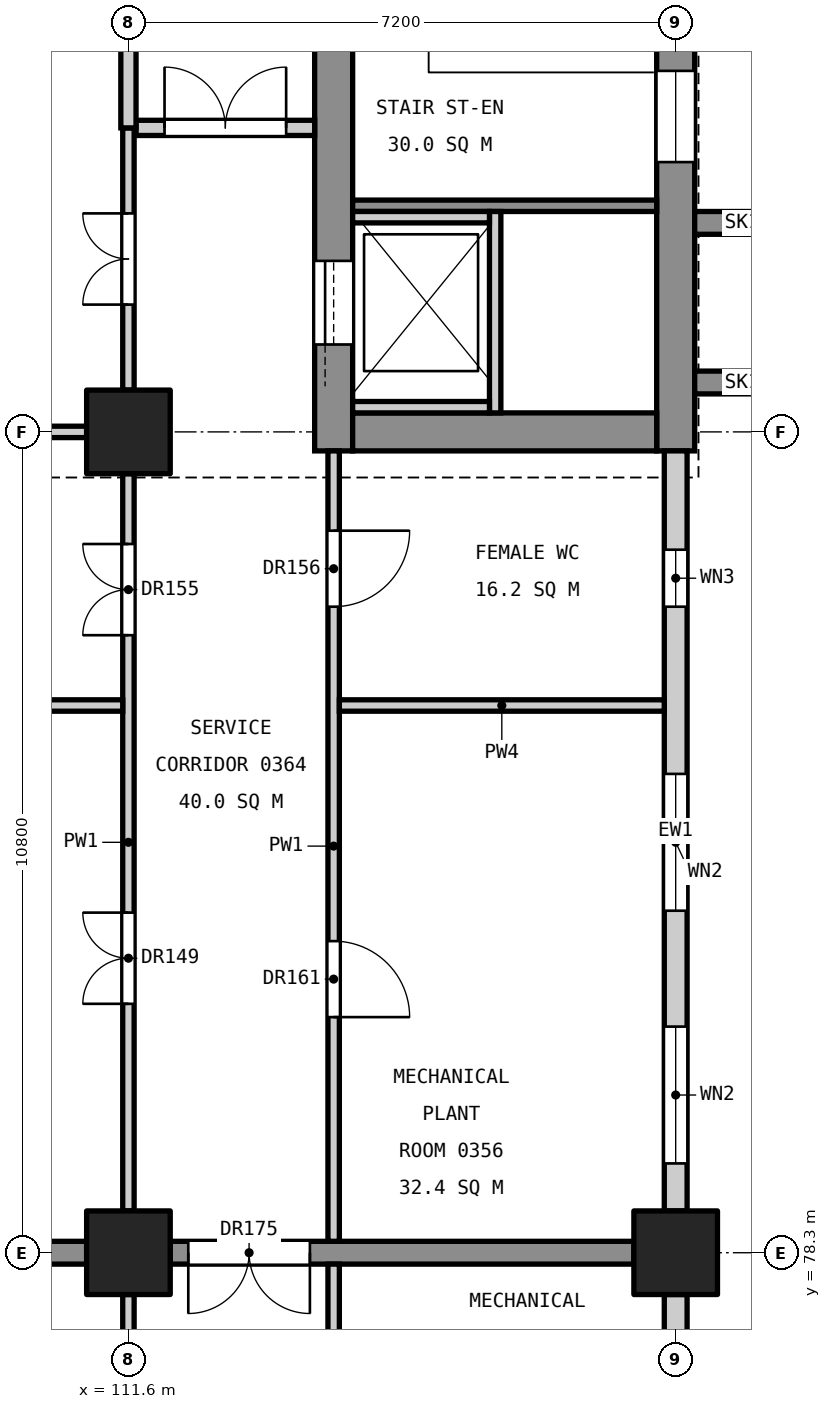
"""IFC4 building model, lengths in metres.
Left out: names, types, materials, properties, quantities, classifications, styles, units other than length and angle.
Written with IfcOpenShell. Run it as: python <this file> out.ifc"""

import sys

from ifc_helpers import new_model, si_unit, direction, frame, frame_2d, origin, origin_2d, place, context, subcontext, project, spatial, rectangle, extrude, element, fill, save


model = new_model("IFC4")
c1 = context("Model", 3, precision=1e-05, world=origin(), true_north=direction((0.0, 1.0)))
c2 = subcontext(c1, "Body", "Model", "MODEL_VIEW")
j1 = project(units=[si_unit("LENGTHUNIT", "METRE"), si_unit("PLANEANGLEUNIT", "RADIAN")], contexts=[c1])
p1 = place(None, origin())
s1 = spatial("IfcSite", under=j1, at=p1, CompositionType="ELEMENT")
p2 = place(p1, origin())
s2 = spatial("IfcBuilding", under=s1, at=p2, CompositionType="ELEMENT")
p3 = place(p2, frame((0.0, 0.0, 16.8)))
s3 = spatial("IfcBuildingStorey", under=s2, at=p3, CompositionType="ELEMENT", Elevation=16.8)
for number, where, z_axis, x_axis in (
    (1, (118.8, 78.3, 0.0), (0.0, 0.0, 1.0), (1.0, 0.0, 0.0)),
    (2, (111.6, 78.3, 0.0), (0.0, 0.0, 1.0), (1.0, 0.0, 0.0)),
    (3, (111.6, 89.1, 0.0), (0.0, 0.0, 1.0), (1.0, 0.0, 0.0)),
):
    element("IfcColumn", number, at=place(p3, frame(where, z_axis=z_axis, x_axis=x_axis)), inside=s3, PredefinedType="COLUMN", context=c2, shape_type="SweptSolid", body=[
        extrude(rectangle(XDim=1.1, YDim=1.1, at=origin_2d()), origin(), (0.0, 0.0, 1.0), 5.4),
    ])
p4 = place(p3, frame((118.8, 88.85, 0.0), z_axis=(0.0, 0.0, 1.0), x_axis=(0.0, 1.0, 0.0)))
e4 = element("IfcWall", 4, at=p4, inside=s3, PredefinedType="SHEAR", context=c2, shape_type="SweptSolid", body=[
    extrude(rectangle(XDim=11.3, YDim=0.5, at=frame_2d((5.65, 0.0))), origin(), (0.0, 0.0, 1.0), 5.15),
])
p5 = place(p4, frame((3.8, 0.0, 3.4)))
e5 = element("IfcOpeningElement", 5, at=p5, cuts=e4, PredefinedType="OPENING", context=c2, shape_type="SweptSolid", body=[
    extrude(rectangle(XDim=1.2, YDim=0.9, at=frame_2d((0.6, 0.45))), frame((0.0, 0.26, 0.0), z_axis=(0.0, -1.0, 0.0), x_axis=(1.0, 0.0, 0.0)), (0.0, 0.0, 1.0), 0.52),
])
p6 = place(p3, frame((114.3, 88.85, 0.0), z_axis=(0.0, 0.0, 1.0), x_axis=(0.0, 1.0, 0.0)))
e6 = element("IfcWall", 6, at=p6, inside=s3, PredefinedType="SHEAR", context=c2, shape_type="SweptSolid", body=[
    extrude(rectangle(XDim=11.3, YDim=0.5, at=frame_2d((5.65, 0.0))), origin(), (0.0, 0.0, 1.0), 5.15),
])
p7 = place(p6, frame((9.35, 0.0, 0.0)))
e7 = element("IfcOpeningElement", 7, at=p7, cuts=e6, PredefinedType="OPENING", context=c2, shape_type="SweptSolid", body=[
    extrude(rectangle(XDim=1.4, YDim=2.1, at=frame_2d((0.7, 1.05))), frame((0.0, 0.26, 0.0), z_axis=(0.0, -1.0, 0.0), x_axis=(1.0, 0.0, 0.0)), (0.0, 0.0, 1.0), 0.52),
])
p8 = place(p6, frame((1.4, 0.0, 0.0)))
e8 = element("IfcOpeningElement", 8, at=p8, cuts=e6, PredefinedType="OPENING", context=c2, shape_type="SweptSolid", body=[
    extrude(rectangle(XDim=1.1, YDim=2.1, at=frame_2d((0.55, 1.05))), frame((0.0, 0.26, 0.0), z_axis=(0.0, -1.0, 0.0), x_axis=(1.0, 0.0, 0.0)), (0.0, 0.0, 1.0), 0.52),
])
p9 = place(p3, frame((118.55, 89.1, 0.0), z_axis=(0.0, 0.0, 1.0), x_axis=(-1.0, 0.0, 0.0)))
e9 = element("IfcWall", 9, at=p9, inside=s3, PredefinedType="SHEAR", context=c2, shape_type="SweptSolid", body=[
    extrude(rectangle(XDim=4.0, YDim=0.5, at=frame_2d((2.0, 0.0))), origin(), (0.0, 0.0, 1.0), 5.15),
])
for number, where, z_axis, x_axis in (
    (10, (119.05, 89.75, 0.0), (0.0, 0.0, 1.0), (1.0, 0.0, 0.0)),
    (11, (119.05, 91.85, 0.0), (0.0, 0.0, 1.0), (1.0, 0.0, 0.0)),
):
    element("IfcWall", number, at=place(p3, frame(where, z_axis=z_axis, x_axis=x_axis)), inside=s3, PredefinedType="SHEAR", context=c2, shape_type="SweptSolid", body=[
        extrude(rectangle(XDim=1.25, YDim=0.3, at=frame_2d((0.625, 0.0))), origin(), (0.0, 0.0, 1.0), 5.4),
    ])
p10 = place(p3, frame((118.25, 78.3, 0.0), z_axis=(0.0, 0.0, 1.0), x_axis=(-1.0, 0.0, 0.0)))
e12 = element("IfcWall", 12, at=p10, inside=s3, PredefinedType="SHEAR", context=c2, shape_type="SweptSolid", body=[
    extrude(rectangle(XDim=6.1, YDim=0.3, at=frame_2d((3.05, 0.0))), origin(), (0.0, 0.0, 1.0), 5.15),
])
p11 = place(p10, frame((4.262, 0.0, 0.0)))
e13 = element("IfcOpeningElement", 13, at=p11, cuts=e12, PredefinedType="OPENING", context=c2, shape_type="SweptSolid", body=[
    extrude(rectangle(XDim=1.6, YDim=2.1, at=frame_2d((0.8, 1.05))), frame((0.0, 0.16, 0.0), z_axis=(0.0, -1.0, 0.0), x_axis=(1.0, 0.0, 0.0)), (0.0, 0.0, 1.0), 0.32),
])
p12 = place(p3, frame((111.05, 78.3, 0.0), z_axis=(0.0, 0.0, 1.0), x_axis=(-1.0, 0.0, 0.0)))
e14 = element("IfcWall", 14, at=p12, inside=s3, PredefinedType="SHEAR", context=c2, shape_type="SweptSolid", body=[
    extrude(rectangle(XDim=9.7, YDim=0.3, at=frame_2d((4.85, 0.0))), origin(), (0.0, 0.0, 1.0), 5.15),
])
p13 = place(p3, frame((118.55, 92.075, 0.0), z_axis=(0.0, 0.0, 1.0), x_axis=(-1.0, 0.0, 0.0)))
e15 = element("IfcWall", 15, at=p13, inside=s3, PredefinedType="SOLIDWALL", context=c2, shape_type="SweptSolid", body=[
    extrude(rectangle(XDim=4.0, YDim=0.15, at=frame_2d((2.0, 0.0))), origin(), (0.0, 0.0, 1.0), 5.15),
])
p14 = place(p3, frame((116.425, 92.0, 0.0), z_axis=(0.0, 0.0, 1.0), x_axis=(0.0, -1.0, 0.0)))
e16 = element("IfcWall", 16, at=p14, inside=s3, PredefinedType="SOLIDWALL", context=c2, shape_type="SweptSolid", body=[
    extrude(rectangle(XDim=2.65, YDim=0.15, at=frame_2d((1.325, 0.0))), origin(), (0.0, 0.0, 1.0), 5.4),
])
for number, where, z_axis, x_axis in (
    (17, (116.35, 91.925, 0.0), (0.0, 0.0, 1.0), (-1.0, 0.0, 0.0)),
    (18, (116.35, 89.425, 0.0), (0.0, 0.0, 1.0), (-1.0, 0.0, 0.0)),
):
    element("IfcWall", number, at=place(p3, frame(where, z_axis=z_axis, x_axis=x_axis)), inside=s3, PredefinedType="SOLIDWALL", context=c2, shape_type="SweptSolid", body=[
        extrude(rectangle(XDim=1.8, YDim=0.15, at=frame_2d((0.9, 0.0))), origin(), (0.0, 0.0, 1.0), 5.4),
    ])
p15 = place(p3, frame((118.8, 74.95, 0.0), z_axis=(0.0, 0.0, 1.0), x_axis=(0.0, 1.0, 0.0)))
e19 = element("IfcWall", 19, at=p15, inside=s3, PredefinedType="STANDARD", context=c2, shape_type="SweptSolid", body=[
    extrude(rectangle(XDim=2.8, YDim=0.3, at=frame_2d((1.4, 0.0))), origin(), (0.0, 0.0, 1.0), 4.25),
])
p16 = place(p15, frame((1.025, 0.0, 0.8)))
e20 = element("IfcOpeningElement", 20, at=p16, cuts=e19, PredefinedType="OPENING", context=c2, shape_type="SweptSolid", body=[
    extrude(rectangle(XDim=0.75, YDim=1.2, at=frame_2d((0.375, 0.6))), frame((0.0, 0.16, 0.0), z_axis=(0.0, -1.0, 0.0), x_axis=(1.0, 0.0, 0.0)), (0.0, 0.0, 1.0), 0.32),
])
p17 = place(p3, frame((118.8, 78.85, 0.0), z_axis=(0.0, 0.0, 1.0), x_axis=(0.0, 1.0, 0.0)))
e21 = element("IfcWall", 21, at=p17, inside=s3, PredefinedType="STANDARD", context=c2, shape_type="SweptSolid", body=[
    extrude(rectangle(XDim=10.0, YDim=0.3, at=frame_2d((5.0, 0.0))), origin(), (0.0, 0.0, 1.0), 4.25),
])
p18 = place(p17, frame((0.625, 0.0, 0.9)))
e22 = element("IfcOpeningElement", 22, at=p18, cuts=e21, PredefinedType="OPENING", context=c2, shape_type="SweptSolid", body=[
    extrude(rectangle(XDim=1.8, YDim=3.0, at=frame_2d((0.9, 1.5))), frame((0.0, 0.16, 0.0), z_axis=(0.0, -1.0, 0.0), x_axis=(1.0, 0.0, 0.0)), (0.0, 0.0, 1.0), 0.32),
])
p19 = place(p17, frame((3.95, 0.0, 0.9)))
e23 = element("IfcOpeningElement", 23, at=p19, cuts=e21, PredefinedType="OPENING", context=c2, shape_type="SweptSolid", body=[
    extrude(rectangle(XDim=1.8, YDim=3.0, at=frame_2d((0.9, 1.5))), frame((0.0, 0.16, 0.0), z_axis=(0.0, -1.0, 0.0), x_axis=(1.0, 0.0, 0.0)), (0.0, 0.0, 1.0), 0.32),
])
p20 = place(p17, frame((7.95, 0.0, 0.8)))
e24 = element("IfcOpeningElement", 24, at=p20, cuts=e21, PredefinedType="OPENING", context=c2, shape_type="SweptSolid", body=[
    extrude(rectangle(XDim=0.75, YDim=1.2, at=frame_2d((0.375, 0.6))), frame((0.0, 0.16, 0.0), z_axis=(0.0, -1.0, 0.0), x_axis=(1.0, 0.0, 0.0)), (0.0, 0.0, 1.0), 0.32),
])
p21 = place(p3, frame((114.3, 74.95, 0.0), z_axis=(0.0, 0.0, 1.0), x_axis=(0.0, 1.0, 0.0)))
e25 = element("IfcWall", 25, at=p21, inside=s3, PredefinedType="PARTITIONING", context=c2, shape_type="SweptSolid", body=[
    extrude(rectangle(XDim=3.2, YDim=0.15, at=frame_2d((1.6, 0.0))), origin(), (0.0, 0.0, 1.0), 4.05),
])
p22 = place(p21, frame((1.05, 0.0, 0.0)))
e26 = element("IfcOpeningElement", 26, at=p22, cuts=e25, PredefinedType="OPENING", context=c2, shape_type="SweptSolid", body=[
    extrude(rectangle(XDim=1.0, YDim=2.1, at=frame_2d((0.5, 1.05))), frame((0.0, 0.085, 0.0), z_axis=(0.0, -1.0, 0.0), x_axis=(1.0, 0.0, 0.0)), (0.0, 0.0, 1.0), 0.17),
])
p23 = place(p3, frame((114.3, 78.45, 0.0), z_axis=(0.0, 0.0, 1.0), x_axis=(0.0, 1.0, 0.0)))
e27 = element("IfcWall", 27, at=p23, inside=s3, PredefinedType="PARTITIONING", context=c2, shape_type="SweptSolid", body=[
    extrude(rectangle(XDim=10.4, YDim=0.15, at=frame_2d((5.2, 0.0))), origin(), (0.0, 0.0, 1.0), 4.05),
])
p24 = place(p23, frame((8.35, 0.0, 0.0)))
e28 = element("IfcOpeningElement", 28, at=p24, cuts=e27, PredefinedType="OPENING", context=c2, shape_type="SweptSolid", body=[
    extrude(rectangle(XDim=1.0, YDim=2.1, at=frame_2d((0.5, 1.05))), frame((0.0, 0.085, 0.0), z_axis=(0.0, -1.0, 0.0), x_axis=(1.0, 0.0, 0.0)), (0.0, 0.0, 1.0), 0.17),
])
p25 = place(p23, frame((2.95, 0.0, 0.0)))
e29 = element("IfcOpeningElement", 29, at=p25, cuts=e27, PredefinedType="OPENING", context=c2, shape_type="SweptSolid", body=[
    extrude(rectangle(XDim=1.0, YDim=2.1, at=frame_2d((0.5, 1.05))), frame((0.0, 0.085, 0.0), z_axis=(0.0, -1.0, 0.0), x_axis=(1.0, 0.0, 0.0)), (0.0, 0.0, 1.0), 0.17),
])
p26 = place(p3, frame((118.65, 85.5, 0.0), z_axis=(0.0, 0.0, 1.0), x_axis=(-1.0, 0.0, 0.0)))
e30 = element("IfcWall", 30, at=p26, inside=s3, PredefinedType="PARTITIONING", context=c2, shape_type="SweptSolid", body=[
    extrude(rectangle(XDim=4.275, YDim=0.15, at=frame_2d((2.137, 0.0))), origin(), (0.0, 0.0, 1.0), 4.05),
])
p27 = place(p3, frame((114.05, 93.1, 0.0), z_axis=(0.0, 0.0, 1.0), x_axis=(-1.0, 0.0, 0.0)))
e31 = element("IfcWall", 31, at=p27, inside=s3, PredefinedType="PARTITIONING", context=c2, shape_type="SweptSolid", body=[
    extrude(rectangle(XDim=2.35, YDim=0.2, at=frame_2d((1.175, 0.0))), origin(), (0.0, 0.0, 1.0), 4.05),
])
p28 = place(p27, frame((0.375, 0.0, 0.0)))
e32 = element("IfcOpeningElement", 32, at=p28, cuts=e31, PredefinedType="OPENING", context=c2, shape_type="SweptSolid", body=[
    extrude(rectangle(XDim=1.6, YDim=2.1, at=frame_2d((0.8, 1.05))), frame((0.0, 0.11, 0.0), z_axis=(0.0, -1.0, 0.0), x_axis=(1.0, 0.0, 0.0)), (0.0, 0.0, 1.0), 0.22),
])
p29 = place(p3, frame((111.6, 70.8, 0.0), z_axis=(0.0, 0.0, 1.0), x_axis=(0.0, 1.0, 0.0)))
e33 = element("IfcWall", 33, at=p29, inside=s3, PredefinedType="PARTITIONING", context=c2, shape_type="SweptSolid", body=[
    extrude(rectangle(XDim=6.95, YDim=0.15, at=frame_2d((3.475, 0.0))), origin(), (0.0, 0.0, 1.0), 4.15),
])
p30 = place(p29, frame((2.875, 0.0, 0.0)))
e34 = element("IfcOpeningElement", 34, at=p30, cuts=e33, PredefinedType="OPENING", context=c2, shape_type="SweptSolid", body=[
    extrude(rectangle(XDim=1.2, YDim=2.1, at=frame_2d((0.6, 1.05))), frame((0.0, 0.085, 0.0), z_axis=(0.0, -1.0, 0.0), x_axis=(1.0, 0.0, 0.0)), (0.0, 0.0, 1.0), 0.17),
])
p31 = place(p3, frame((111.6, 78.85, 0.0), z_axis=(0.0, 0.0, 1.0), x_axis=(0.0, 1.0, 0.0)))
e35 = element("IfcWall", 35, at=p31, inside=s3, PredefinedType="PARTITIONING", context=c2, shape_type="SweptSolid", body=[
    extrude(rectangle(XDim=9.7, YDim=0.15, at=frame_2d((4.85, 0.0))), origin(), (0.0, 0.0, 1.0), 4.15),
])
p32 = place(p31, frame((2.725, 0.0, 0.0)))
e36 = element("IfcOpeningElement", 36, at=p32, cuts=e35, PredefinedType="OPENING", context=c2, shape_type="SweptSolid", body=[
    extrude(rectangle(XDim=1.2, YDim=2.1, at=frame_2d((0.6, 1.05))), frame((0.0, 0.085, 0.0), z_axis=(0.0, -1.0, 0.0), x_axis=(1.0, 0.0, 0.0)), (0.0, 0.0, 1.0), 0.17),
])
p33 = place(p31, frame((7.575, 0.0, 0.0)))
e37 = element("IfcOpeningElement", 37, at=p33, cuts=e35, PredefinedType="OPENING", context=c2, shape_type="SweptSolid", body=[
    extrude(rectangle(XDim=1.2, YDim=2.1, at=frame_2d((0.6, 1.05))), frame((0.0, 0.085, 0.0), z_axis=(0.0, -1.0, 0.0), x_axis=(1.0, 0.0, 0.0)), (0.0, 0.0, 1.0), 0.17),
])
p34 = place(p3, frame((111.6, 89.65, 0.0), z_axis=(0.0, 0.0, 1.0), x_axis=(0.0, 1.0, 0.0)))
e38 = element("IfcWall", 38, at=p34, inside=s3, PredefinedType="PARTITIONING", context=c2, shape_type="SweptSolid", body=[
    extrude(rectangle(XDim=3.45, YDim=0.15, at=frame_2d((1.725, 0.0))), origin(), (0.0, 0.0, 1.0), 4.15),
])
p35 = place(p34, frame((1.125, 0.0, 0.0)))
e39 = element("IfcOpeningElement", 39, at=p35, cuts=e38, PredefinedType="OPENING", context=c2, shape_type="SweptSolid", body=[
    extrude(rectangle(XDim=1.2, YDim=2.1, at=frame_2d((0.6, 1.05))), frame((0.0, 0.085, 0.0), z_axis=(0.0, -1.0, 0.0), x_axis=(1.0, 0.0, 0.0)), (0.0, 0.0, 1.0), 0.17),
])
p36 = place(p3, frame((111.6, 93.1, 0.0), z_axis=(0.0, 0.0, 1.0), x_axis=(0.0, 1.0, 0.0)))
e40 = element("IfcWall", 40, at=p36, inside=s3, PredefinedType="PARTITIONING", context=c2, shape_type="SweptSolid", body=[
    extrude(rectangle(XDim=6.25, YDim=0.2, at=frame_2d((3.125, 0.0))), origin(), (0.0, 0.0, 1.0), 4.15),
])
p37 = place(p3, frame((111.525, 85.5, 0.0), z_axis=(0.0, 0.0, 1.0), x_axis=(-1.0, 0.0, 0.0)))
e41 = element("IfcWall", 41, at=p37, inside=s3, PredefinedType="PARTITIONING", context=c2, shape_type="SweptSolid", body=[
    extrude(rectangle(XDim=10.575, YDim=0.15, at=frame_2d((5.288, 0.0))), origin(), (0.0, 0.0, 1.0), 4.05),
])
p38 = place(p3, frame((111.05, 89.1, 0.0), z_axis=(0.0, 0.0, 1.0), x_axis=(-1.0, 0.0, 0.0)))
e42 = element("IfcWall", 42, at=p38, inside=s3, PredefinedType="PARTITIONING", context=c2, shape_type="SweptSolid", body=[
    extrude(rectangle(XDim=9.7, YDim=0.15, at=frame_2d((4.85, 0.0))), origin(), (0.0, 0.0, 1.0), 4.05),
])
p39 = place(p8, origin())
e43 = element("IfcDoor", 43, at=p39, inside=s3, OperationType="SLIDING_TO_LEFT", PredefinedType="DOOR", context=c2, shape_type="SweptSolid", body=[
    extrude(rectangle(XDim=1.1, YDim=2.1, at=frame_2d((0.55, 1.05))), frame((0.0, 0.025, 0.0), z_axis=(0.0, -1.0, 0.0), x_axis=(1.0, 0.0, 0.0)), (0.0, 0.0, 1.0), 0.05),
])
fill(e8, e43)
p40 = place(p18, origin())
e44 = element("IfcWindow", 44, at=p40, inside=s3, PartitioningType="SINGLE_PANEL", PredefinedType="WINDOW", context=c2, shape_type="SweptSolid", body=[
    extrude(rectangle(XDim=1.8, YDim=3.0, at=frame_2d((0.9, 1.5))), frame((0.0, 0.03, 0.0), z_axis=(0.0, -1.0, 0.0), x_axis=(1.0, 0.0, 0.0)), (0.0, 0.0, 1.0), 0.06),
])
fill(e22, e44)
p41 = place(p19, origin())
e45 = element("IfcWindow", 45, at=p41, inside=s3, PartitioningType="SINGLE_PANEL", PredefinedType="WINDOW", context=c2, shape_type="SweptSolid", body=[
    extrude(rectangle(XDim=1.8, YDim=3.0, at=frame_2d((0.9, 1.5))), frame((0.0, 0.03, 0.0), z_axis=(0.0, -1.0, 0.0), x_axis=(1.0, 0.0, 0.0)), (0.0, 0.0, 1.0), 0.06),
])
fill(e23, e45)
p42 = place(p20, origin())
e46 = element("IfcWindow", 46, at=p42, inside=s3, PartitioningType="SINGLE_PANEL", PredefinedType="WINDOW", context=c2, shape_type="SweptSolid", body=[
    extrude(rectangle(XDim=0.75, YDim=1.2, at=frame_2d((0.375, 0.6))), frame((0.0, 0.03, 0.0), z_axis=(0.0, -1.0, 0.0), x_axis=(1.0, 0.0, 0.0)), (0.0, 0.0, 1.0), 0.06),
])
fill(e24, e46)
p43 = place(p5, origin())
e47 = element("IfcWindow", 47, at=p43, inside=s3, PartitioningType="SINGLE_PANEL", PredefinedType="WINDOW", context=c2, shape_type="SweptSolid", body=[
    extrude(rectangle(XDim=1.2, YDim=0.9, at=frame_2d((0.6, 0.45))), frame((0.0, 0.03, 0.0), z_axis=(0.0, -1.0, 0.0), x_axis=(1.0, 0.0, 0.0)), (0.0, 0.0, 1.0), 0.06),
])
fill(e5, e47)
p44 = place(p32, origin())
e48 = element("IfcDoor", 48, at=p44, inside=s3, OperationType="DOUBLE_DOOR_SINGLE_SWING", PredefinedType="DOOR", context=c2, shape_type="SweptSolid", body=[
    extrude(rectangle(XDim=1.2, YDim=2.1, at=frame_2d((0.6, 1.05))), frame((0.0, 0.025, 0.0), z_axis=(0.0, -1.0, 0.0), x_axis=(1.0, 0.0, 0.0)), (0.0, 0.0, 1.0), 0.05),
])
fill(e36, e48)
p45 = place(p35, origin())
e49 = element("IfcDoor", 49, at=p45, inside=s3, OperationType="DOUBLE_DOOR_SINGLE_SWING", PredefinedType="DOOR", context=c2, shape_type="SweptSolid", body=[
    extrude(rectangle(XDim=1.2, YDim=2.1, at=frame_2d((0.6, 1.05))), frame((0.0, 0.025, 0.0), z_axis=(0.0, -1.0, 0.0), x_axis=(1.0, 0.0, 0.0)), (0.0, 0.0, 1.0), 0.05),
])
fill(e39, e49)
p46 = place(p33, origin())
e50 = element("IfcDoor", 50, at=p46, inside=s3, OperationType="DOUBLE_DOOR_SINGLE_SWING", PredefinedType="DOOR", context=c2, shape_type="SweptSolid", body=[
    extrude(rectangle(XDim=1.2, YDim=2.1, at=frame_2d((0.6, 1.05))), frame((0.0, 0.025, 0.0), z_axis=(0.0, -1.0, 0.0), x_axis=(1.0, 0.0, 0.0)), (0.0, 0.0, 1.0), 0.05),
])
fill(e37, e50)
p47 = place(p24, frame((1.0, 0.0, 0.0), z_axis=(0.0, 0.0, 1.0), x_axis=(-1.0, 0.0, 0.0)))
e51 = element("IfcDoor", 51, at=p47, inside=s3, OperationType="SINGLE_SWING_LEFT", PredefinedType="DOOR", context=c2, shape_type="SweptSolid", body=[
    extrude(rectangle(XDim=1.0, YDim=2.1, at=frame_2d((0.5, 1.05))), frame((0.0, 0.025, 0.0), z_axis=(0.0, -1.0, 0.0), x_axis=(1.0, 0.0, 0.0)), (0.0, 0.0, 1.0), 0.05),
])
fill(e28, e51)
p48 = place(p25, frame((1.0, 0.0, 0.0), z_axis=(0.0, 0.0, 1.0), x_axis=(-1.0, 0.0, 0.0)))
e52 = element("IfcDoor", 52, at=p48, inside=s3, OperationType="SINGLE_SWING_RIGHT", PredefinedType="DOOR", context=c2, shape_type="SweptSolid", body=[
    extrude(rectangle(XDim=1.0, YDim=2.1, at=frame_2d((0.5, 1.05))), frame((0.0, 0.025, 0.0), z_axis=(0.0, -1.0, 0.0), x_axis=(1.0, 0.0, 0.0)), (0.0, 0.0, 1.0), 0.05),
])
fill(e29, e52)
p49 = place(p28, frame((1.6, 0.0, 0.0), z_axis=(0.0, 0.0, 1.0), x_axis=(-1.0, 0.0, 0.0)))
e53 = element("IfcDoor", 53, at=p49, inside=s3, OperationType="DOUBLE_DOOR_SINGLE_SWING", PredefinedType="DOOR", context=c2, shape_type="SweptSolid", body=[
    extrude(rectangle(XDim=1.6, YDim=2.1, at=frame_2d((0.8, 1.05))), frame((0.0, 0.025, 0.0), z_axis=(0.0, -1.0, 0.0), x_axis=(1.0, 0.0, 0.0)), (0.0, 0.0, 1.0), 0.05),
])
fill(e32, e53)
p50 = place(p11, origin())
e54 = element("IfcDoor", 54, at=p50, inside=s3, OperationType="DOUBLE_DOOR_SINGLE_SWING", PredefinedType="DOOR", context=c2, shape_type="SweptSolid", body=[
    extrude(rectangle(XDim=1.6, YDim=2.1, at=frame_2d((0.8, 1.05))), frame((0.0, 0.025, 0.0), z_axis=(0.0, -1.0, 0.0), x_axis=(1.0, 0.0, 0.0)), (0.0, 0.0, 1.0), 0.05),
])
fill(e13, e54)
save(model, sys.argv[1])
